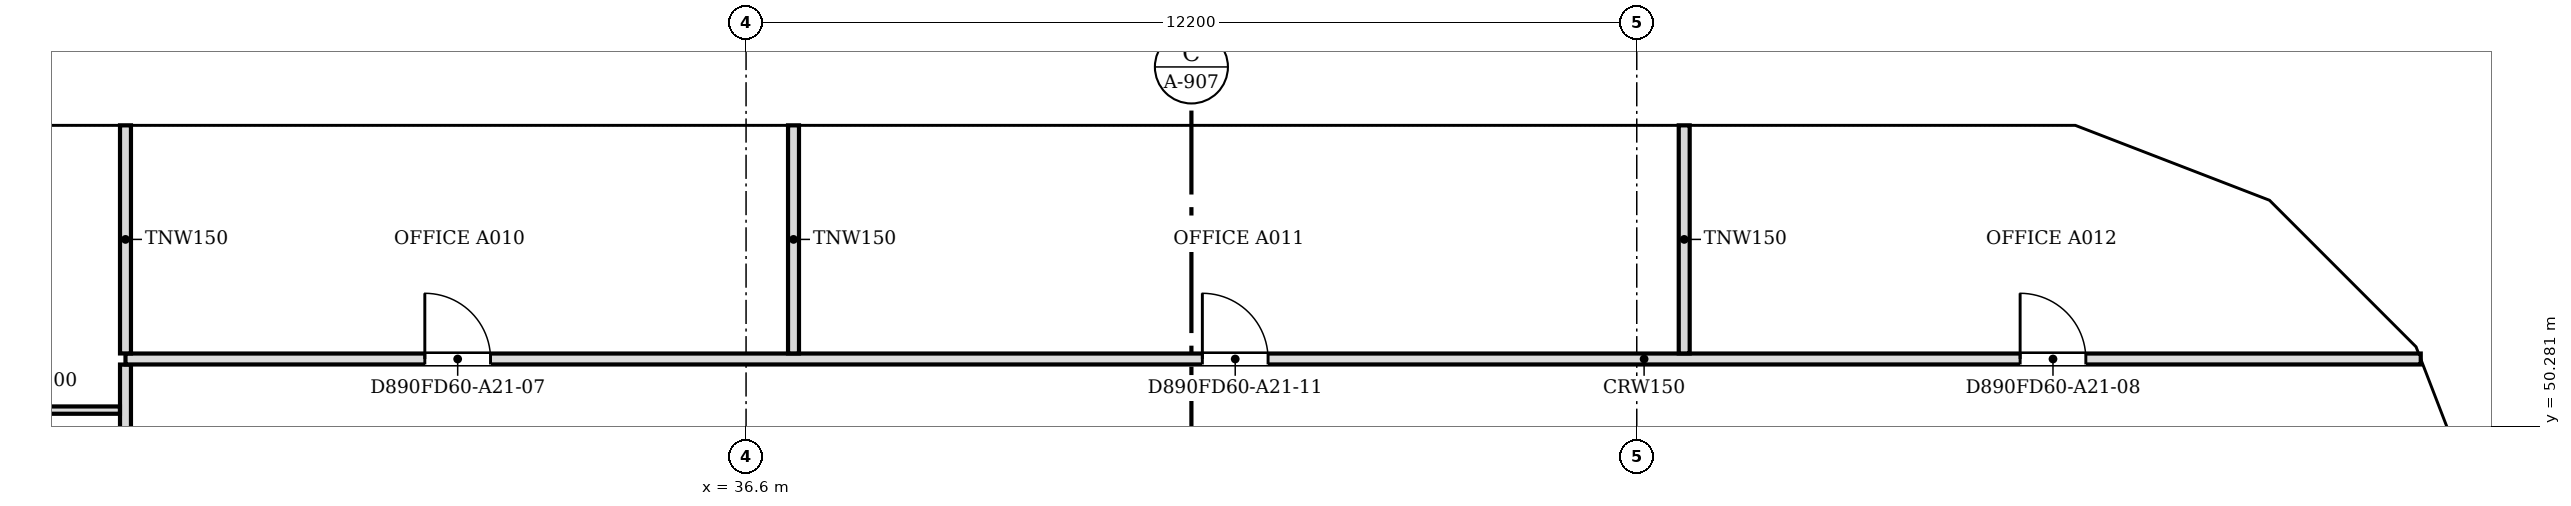
"""IFC4 building model, lengths in metres.
Left out: names, types, materials, properties, quantities, classifications, styles, units other than length and angle.
Written with IfcOpenShell. Run it as: python <this file> out.ifc"""

import sys

from ifc_helpers import new_model, si_unit, direction, frame, frame_2d, origin, place, context, subcontext, project, spatial, polyline, rectangle, outline, extrude, faceted_brep, source, transform, mapped, element, fill, save


model = new_model("IFC4")
c1 = context("Model", 3, precision=1e-05, world=origin(), true_north=direction((0.0, 1.0)))
c2 = subcontext(c1, "Body", "Model", "MODEL_VIEW")
j1 = project(units=[si_unit("LENGTHUNIT", "METRE"), si_unit("PLANEANGLEUNIT", "RADIAN")], contexts=[c1])
p1 = place(None, origin())
s1 = spatial("IfcSite", under=j1, at=p1, CompositionType="ELEMENT")
p2 = place(p1, origin())
s2 = spatial("IfcBuilding", under=s1, at=p2, CompositionType="ELEMENT")
p3 = place(p2, frame((0.0, 0.0, 240.7)))
s3 = spatial("IfcBuildingStorey", under=s2, at=p3, CompositionType="ELEMENT", Elevation=240.7)
m1 = source(origin(), c2, "Body", "Brep", [
    faceted_brep([(0.047, -0.25, 0.0), (2.997, -0.25, 3.8), (0.047, -0.25, 7.6), (0.0, -0.25, 7.541), (0.0, -0.25, 0.059), (0.093, 0.25, 7.54), (2.944, 0.25, 3.868), (2.944, 0.25, 3.732), (0.093, 0.25, 0.06), (2.997, 0.0, 3.8), (0.047, 0.0, 0.0), (0.047, 0.0, 7.6)], [[[0, 1, 2, 3, 4]], [[5, 6, 7, 8]], [[8, 7, 9, 1, 0, 10]], [[6, 5, 11, 2, 1, 9]], [[3, 2, 11]], [[10, 0, 4]], [[8, 10, 4, 3, 11, 5]], [[9, 7, 6]]]),
])
p4 = place(p3, frame((60.767, 48.71, -3.8), z_axis=(0.0, 0.0, 1.0), x_axis=(-0.359901446078, 0.932990326376, 0.0)))
e1 = element("IfcWall", 1, at=p4, inside=s3, PredefinedType="SOLIDWALL", context=c2, shape_type="MappedRepresentation", body=[
    mapped(m1, transform((0.0, 0.0, 0.0), scale=1.0)),
])
m2 = source(origin(), c2, "Body", "SweptSolid", [
    extrude(outline(polyline([(0.247, 0.665), (2.681, 3.8), (0.247, 6.935), (0.247, 0.665)])), frame((0.0, 0.26, 0.0), z_axis=(0.0, -1.0, 0.0), x_axis=(1.0, 0.0, 0.0)), (0.0, 0.0, 1.0), 0.52),
])
p5 = place(p4, origin())
e2 = element("IfcOpeningElement", 2, at=p5, cuts=e1, PredefinedType="OPENING", context=c2, shape_type="MappedRepresentation", body=[
    mapped(m2, transform((0.0, 0.0, 0.0), scale=1.0)),
])
m3 = source(origin(), c2, "Body", "Brep", [
    faceted_brep([(2.944, -0.25, 0.0), (2.997, -0.25, 0.068), (2.997, -0.25, 7.532), (2.944, -0.25, 7.6), (0.0, -0.25, 3.8), (0.053, 0.25, 3.868), (2.891, 0.25, 7.532), (2.891, 0.25, 0.068), (0.053, 0.25, 3.732), (2.944, 0.0, 0.0), (2.944, 0.0, 7.6), (0.0, 0.0, 3.8)], [[[0, 1, 2, 3, 4]], [[5, 6, 7, 8]], [[1, 0, 9]], [[10, 3, 2]], [[6, 5, 11, 4, 3, 10]], [[8, 7, 9, 0, 4, 11]], [[8, 11, 5]], [[1, 9, 7, 6, 10, 2]]]),
])
p6 = place(p3, frame((59.688, 51.506, -3.8), z_axis=(0.0, 0.0, 1.0), x_axis=(-0.707106781187, 0.707106781187, 0.0)))
e3 = element("IfcWall", 3, at=p6, inside=s3, PredefinedType="SOLIDWALL", context=c2, shape_type="MappedRepresentation", body=[
    mapped(m3, transform((0.0, 0.0, 0.0), scale=1.0)),
])
m4 = source(origin(), c2, "Body", "SweptSolid", [
    extrude(outline(polyline([(2.744, 6.934), (0.316, 3.8), (2.744, 0.667), (2.744, 6.934)])), frame((0.0, 0.26, 0.0), z_axis=(0.0, -1.0, 0.0), x_axis=(1.0, 0.0, 0.0)), (0.0, 0.0, 1.0), 0.52),
])
p7 = place(p6, origin())
e4 = element("IfcOpeningElement", 4, at=p7, cuts=e3, PredefinedType="OPENING", context=c2, shape_type="MappedRepresentation", body=[
    mapped(m4, transform((0.0, 0.0, 0.0), scale=1.0)),
])
m5 = source(origin(), c2, "Body", "Brep", [
    faceted_brep([(0.053, -0.25, 0.0), (3.003, -0.25, 3.8), (0.053, -0.25, 7.6), (0.0, -0.25, 7.532), (0.0, -0.25, 0.068), (0.106, 0.25, 7.532), (2.957, 0.25, 3.86), (2.957, 0.25, 3.74), (0.106, 0.25, 0.068), (3.003, 0.0, 3.8), (0.053, 0.0, 0.0), (0.053, 0.0, 7.6)], [[[0, 1, 2, 3, 4]], [[5, 6, 7, 8]], [[8, 7, 9, 1, 0, 10]], [[6, 5, 11, 2, 1, 9]], [[3, 2, 11]], [[10, 0, 4]], [[8, 10, 4, 3, 11, 5]], [[9, 7, 6]]]),
])
p8 = place(p3, frame((57.656, 53.569, -3.8), z_axis=(0.0, 0.0, 1.0), x_axis=(-0.933007896601, 0.359855894603, 0.0)))
e5 = element("IfcWall", 5, at=p8, inside=s3, PredefinedType="SOLIDWALL", context=c2, shape_type="MappedRepresentation", body=[
    mapped(m5, transform((0.0, 0.0, 0.0), scale=1.0)),
])
m6 = source(origin(), c2, "Body", "SweptSolid", [
    extrude(outline(polyline([(0.253, 0.665), (2.687, 3.8), (0.253, 6.935), (0.253, 0.665)])), frame((0.0, 0.26, 0.0), z_axis=(0.0, -1.0, 0.0), x_axis=(1.0, 0.0, 0.0)), (0.0, 0.0, 1.0), 0.52),
])
p9 = place(p8, origin())
e6 = element("IfcOpeningElement", 6, at=p9, cuts=e5, PredefinedType="OPENING", context=c2, shape_type="MappedRepresentation", body=[
    mapped(m6, transform((0.0, 0.0, 0.0), scale=1.0)),
])
m7 = source(origin(), c2, "Body", "Brep", [
    faceted_brep([(3.003, -0.25, 0.0), (6.053, -0.25, 3.8), (3.003, -0.25, 7.6), (0.0, -0.25, 3.8), (0.047, 0.25, 3.859), (3.003, 0.25, 7.6), (6.053, 0.25, 3.8), (3.003, 0.25, 0.0), (0.047, 0.25, 3.741), (0.0, 0.0, 3.8)], [[[0, 1, 2, 3]], [[4, 5, 6, 7, 8]], [[7, 6, 1, 0]], [[6, 5, 2, 1]], [[5, 4, 9, 3, 2]], [[8, 7, 0, 3, 9]], [[8, 9, 4]]]),
])
p10 = place(p3, frame((54.854, 54.65, -3.8), z_axis=(0.0, 0.0, 1.0), x_axis=(-1.0, 0.0, 0.0)))
e7 = element("IfcWall", 7, at=p10, inside=s3, PredefinedType="SOLIDWALL", context=c2, shape_type="MappedRepresentation", body=[
    mapped(m7, transform((0.0, 0.0, 0.0), scale=1.0)),
])
m8 = source(origin(), c2, "Body", "SweptSolid", [
    extrude(outline(polyline([(3.005, 0.401), (5.733, 3.8), (3.005, 7.199), (0.319, 3.8), (3.005, 0.401)])), frame((0.0, 0.26, 0.0), z_axis=(0.0, -1.0, 0.0), x_axis=(1.0, 0.0, 0.0)), (0.0, 0.0, 1.0), 0.52),
])
p11 = place(p10, origin())
e8 = element("IfcOpeningElement", 8, at=p11, cuts=e7, PredefinedType="OPENING", context=c2, shape_type="MappedRepresentation", body=[
    mapped(m8, transform((0.0, 0.0, 0.0), scale=1.0)),
])
m9 = source(origin(), c2, "Body", "SweptSolid", [
    extrude(outline(polyline([(3.05, 0.0), (6.1, 3.8), (3.05, 7.6), (0.0, 3.8), (3.05, 0.0)])), frame((0.0, 0.25, 0.0), z_axis=(0.0, -1.0, 0.0), x_axis=(1.0, 0.0, 0.0)), (0.0, 0.0, 1.0), 0.5),
])
p12 = place(p3, frame((48.8, 54.65, -3.8), z_axis=(0.0, 0.0, 1.0), x_axis=(-1.0, 0.0, 0.0)))
e9 = element("IfcWall", 9, at=p12, inside=s3, PredefinedType="SOLIDWALL", context=c2, shape_type="MappedRepresentation", body=[
    mapped(m9, transform((0.0, 0.0, 0.0), scale=1.0)),
])
m10 = source(origin(), c2, "Body", "SweptSolid", [
    extrude(outline(polyline([(3.05, 0.399), (5.78, 3.8), (3.05, 7.201), (0.321, 3.8), (3.05, 0.399)])), frame((0.0, 0.26, 0.0), z_axis=(0.0, -1.0, 0.0), x_axis=(1.0, 0.0, 0.0)), (0.0, 0.0, 1.0), 0.52),
])
p13 = place(p12, origin())
e10 = element("IfcOpeningElement", 10, at=p13, cuts=e9, PredefinedType="OPENING", context=c2, shape_type="MappedRepresentation", body=[
    mapped(m10, transform((0.0, 0.0, 0.0), scale=1.0)),
])
m11 = source(origin(), c2, "Body", "Brep", [
    faceted_brep([(3.05, -0.25, 0.0), (6.1, -0.25, 3.8), (6.1, -0.25, 3.8), (3.05, -0.25, 7.6), (0.0, -0.25, 3.8), (0.0, 0.25, 3.8), (3.05, 0.25, 7.6), (6.1, 0.25, 3.8), (6.1, 0.25, 3.8), (3.05, 0.25, 0.0)], [[[0, 1, 2, 3, 4]], [[5, 6, 7, 8, 9]], [[9, 8, 1, 0]], [[7, 6, 3, 2]], [[6, 5, 4, 3]], [[5, 9, 0, 4]], [[1, 8, 7, 2]]]),
])
p14 = place(p3, frame((42.7, 54.65, -3.8), z_axis=(0.0, 0.0, 1.0), x_axis=(-1.0, 0.0, 0.0)))
e11 = element("IfcWall", 11, at=p14, inside=s3, PredefinedType="SOLIDWALL", context=c2, shape_type="MappedRepresentation", body=[
    mapped(m11, transform((0.0, 0.0, 0.0), scale=1.0)),
])
p15 = place(p14, origin())
e12 = element("IfcOpeningElement", 12, at=p15, cuts=e11, PredefinedType="OPENING", context=c2, shape_type="MappedRepresentation", body=[
    mapped(m10, transform((0.0, 0.0, 0.0), scale=1.0)),
])
p16 = place(p3, frame((36.6, 54.65, -3.8), z_axis=(0.0, 0.0, 1.0), x_axis=(-1.0, 0.0, 0.0)))
e13 = element("IfcWall", 13, at=p16, inside=s3, PredefinedType="SOLIDWALL", context=c2, shape_type="MappedRepresentation", body=[
    mapped(m9, transform((0.0, 0.0, 0.0), scale=1.0)),
])
p17 = place(p16, origin())
e14 = element("IfcOpeningElement", 14, at=p17, cuts=e13, PredefinedType="OPENING", context=c2, shape_type="MappedRepresentation", body=[
    mapped(m10, transform((0.0, 0.0, 0.0), scale=1.0)),
])
p18 = place(p3, frame((30.5, 54.65, -3.8), z_axis=(0.0, 0.0, 1.0), x_axis=(-1.0, 0.0, 0.0)))
e15 = element("IfcWall", 15, at=p18, inside=s3, PredefinedType="SOLIDWALL", context=c2, shape_type="MappedRepresentation", body=[
    mapped(m9, transform((0.0, 0.0, 0.0), scale=1.0)),
])
p19 = place(p18, origin())
e16 = element("IfcOpeningElement", 16, at=p19, cuts=e15, PredefinedType="OPENING", context=c2, shape_type="MappedRepresentation", body=[
    mapped(m10, transform((0.0, 0.0, 0.0), scale=1.0)),
])
p20 = place(p2, frame((0.0, 0.0, 244.5)))
s4 = spatial("IfcBuildingStorey", under=s2, at=p20, CompositionType="ELEMENT", Elevation=244.5)
m12 = source(origin(), c2, "Body", "Brep", [
    faceted_brep([(2.95, -0.25, 0.0), (3.003, -0.25, 0.068), (3.003, -0.25, 7.532), (2.95, -0.25, 7.6), (0.0, -0.25, 3.8), (0.047, 0.25, 3.86), (2.898, 0.25, 7.532), (2.898, 0.25, 0.068), (0.047, 0.25, 3.74), (2.95, 0.0, 0.0), (2.95, 0.0, 7.6), (0.0, 0.0, 3.8)], [[[0, 1, 2, 3, 4]], [[5, 6, 7, 8]], [[1, 0, 9]], [[10, 3, 2]], [[6, 5, 11, 4, 3, 10]], [[8, 7, 9, 0, 4, 11]], [[8, 11, 5]], [[1, 9, 7, 6, 10, 2]]]),
])
p21 = place(p20, frame((60.75, 48.753, -3.8), z_axis=(0.0, 0.0, 1.0), x_axis=(-0.35992665181, 0.932980602862, 0.0)))
e17 = element("IfcWall", 17, at=p21, inside=s4, PredefinedType="SOLIDWALL", context=c2, shape_type="MappedRepresentation", body=[
    mapped(m12, transform((0.0, 0.0, 0.0), scale=1.0)),
])
m13 = source(origin(), c2, "Body", "SweptSolid", [
    extrude(outline(polyline([(2.75, 6.935), (0.316, 3.8), (2.75, 0.665), (2.75, 6.935)])), frame((0.0, 0.26, 0.0), z_axis=(0.0, -1.0, 0.0), x_axis=(1.0, 0.0, 0.0)), (0.0, 0.0, 1.0), 0.52),
])
p22 = place(p21, origin())
e18 = element("IfcOpeningElement", 18, at=p22, cuts=e17, PredefinedType="OPENING", context=c2, shape_type="MappedRepresentation", body=[
    mapped(m13, transform((0.0, 0.0, 0.0), scale=1.0)),
])
m14 = source(origin(), c2, "Body", "Brep", [
    faceted_brep([(0.053, -0.25, 0.0), (2.997, -0.25, 3.8), (0.053, -0.25, 7.6), (0.0, -0.25, 7.532), (0.0, -0.25, 0.068), (0.106, 0.25, 7.532), (2.944, 0.25, 3.868), (2.944, 0.25, 3.732), (0.106, 0.25, 0.068), (2.997, 0.0, 3.8), (0.053, 0.0, 0.0), (0.053, 0.0, 7.6)], [[[0, 1, 2, 3, 4]], [[5, 6, 7, 8]], [[8, 7, 9, 1, 0, 10]], [[6, 5, 11, 2, 1, 9]], [[3, 2, 11]], [[10, 0, 4]], [[8, 10, 4, 3, 11, 5]], [[9, 7, 6]]]),
])
p23 = place(p20, frame((59.726, 51.469, -3.8), z_axis=(0.0, 0.0, 1.0), x_axis=(-0.707106781187, 0.707106781187, 0.0)))
e19 = element("IfcWall", 19, at=p23, inside=s4, PredefinedType="SOLIDWALL", context=c2, shape_type="MappedRepresentation", body=[
    mapped(m14, transform((0.0, 0.0, 0.0), scale=1.0)),
])
m15 = source(origin(), c2, "Body", "SweptSolid", [
    extrude(outline(polyline([(0.253, 0.666), (2.681, 3.8), (0.253, 6.934), (0.253, 0.666)])), frame((0.0, 0.26, 0.0), z_axis=(0.0, -1.0, 0.0), x_axis=(1.0, 0.0, 0.0)), (0.0, 0.0, 1.0), 0.52),
])
p24 = place(p23, origin())
e20 = element("IfcOpeningElement", 20, at=p24, cuts=e19, PredefinedType="OPENING", context=c2, shape_type="MappedRepresentation", body=[
    mapped(m15, transform((0.0, 0.0, 0.0), scale=1.0)),
])
m16 = source(origin(), c2, "Body", "Brep", [
    faceted_brep([(2.95, -0.25, 0.0), (2.997, -0.25, 0.059), (2.997, -0.25, 7.541), (2.95, -0.25, 7.6), (0.0, -0.25, 3.8), (0.053, 0.25, 3.868), (2.904, 0.25, 7.54), (2.904, 0.25, 0.06), (0.053, 0.25, 3.732), (2.95, 0.0, 0.0), (2.95, 0.0, 7.6), (0.0, 0.0, 3.8)], [[[0, 1, 2, 3, 4]], [[5, 6, 7, 8]], [[1, 0, 9]], [[10, 3, 2]], [[6, 5, 11, 4, 3, 10]], [[8, 7, 9, 0, 4, 11]], [[8, 11, 5]], [[1, 9, 7, 6, 10, 2]]]),
])
p25 = place(p20, frame((57.606, 53.588, -3.8), z_axis=(0.0, 0.0, 1.0), x_axis=(-0.932990326376, 0.359901446078, 0.0)))
e21 = element("IfcWall", 21, at=p25, inside=s4, PredefinedType="SOLIDWALL", context=c2, shape_type="MappedRepresentation", body=[
    mapped(m16, transform((0.0, 0.0, 0.0), scale=1.0)),
])
p26 = place(p25, origin())
e22 = element("IfcOpeningElement", 22, at=p26, cuts=e21, PredefinedType="OPENING", context=c2, shape_type="MappedRepresentation", body=[
    mapped(m13, transform((0.0, 0.0, 0.0), scale=1.0)),
])
m17 = source(origin(), c2, "Body", "Brep", [
    faceted_brep([(0.047, -0.25, 0.0), (3.05, -0.25, 3.8), (0.047, -0.25, 7.6), (0.0, -0.25, 7.54), (0.0, -0.25, 0.06), (0.093, 0.25, 7.541), (3.05, 0.25, 3.8), (0.093, 0.25, 0.059), (0.047, 0.0, 0.0), (0.047, 0.0, 7.6)], [[[0, 1, 2, 3, 4]], [[5, 6, 7]], [[7, 6, 1, 0, 8]], [[6, 5, 9, 2, 1]], [[3, 2, 9]], [[8, 0, 4]], [[7, 8, 4, 3, 9, 5]]]),
])
p27 = place(p20, frame((54.9, 54.65, -3.8), z_axis=(0.0, 0.0, 1.0), x_axis=(-1.0, 0.0, 0.0)))
e23 = element("IfcWall", 23, at=p27, inside=s4, PredefinedType="SOLIDWALL", context=c2, shape_type="MappedRepresentation", body=[
    mapped(m17, transform((0.0, 0.0, 0.0), scale=1.0)),
])
m18 = source(origin(), c2, "Body", "SweptSolid", [
    extrude(outline(polyline([(0.247, 0.656), (2.731, 3.8), (0.247, 6.944), (0.247, 0.656)])), frame((0.0, 0.26, 0.0), z_axis=(0.0, -1.0, 0.0), x_axis=(1.0, 0.0, 0.0)), (0.0, 0.0, 1.0), 0.52),
])
p28 = place(p27, origin())
e24 = element("IfcOpeningElement", 24, at=p28, cuts=e23, PredefinedType="OPENING", context=c2, shape_type="MappedRepresentation", body=[
    mapped(m18, transform((0.0, 0.0, 0.0), scale=1.0)),
])
p29 = place(p20, frame((51.85, 54.65, -3.8), z_axis=(0.0, 0.0, 1.0), x_axis=(-1.0, 0.0, 0.0)))
e25 = element("IfcWall", 25, at=p29, inside=s4, PredefinedType="SOLIDWALL", context=c2, shape_type="MappedRepresentation", body=[
    mapped(m9, transform((0.0, 0.0, 0.0), scale=1.0)),
])
p30 = place(p29, origin())
e26 = element("IfcOpeningElement", 26, at=p30, cuts=e25, PredefinedType="OPENING", context=c2, shape_type="MappedRepresentation", body=[
    mapped(m10, transform((0.0, 0.0, 0.0), scale=1.0)),
])
p31 = place(p20, frame((45.75, 54.65, -3.8), z_axis=(0.0, 0.0, 1.0), x_axis=(-1.0, 0.0, 0.0)))
e27 = element("IfcWall", 27, at=p31, inside=s4, PredefinedType="SOLIDWALL", context=c2, shape_type="MappedRepresentation", body=[
    mapped(m9, transform((0.0, 0.0, 0.0), scale=1.0)),
])
p32 = place(p31, origin())
e28 = element("IfcOpeningElement", 28, at=p32, cuts=e27, PredefinedType="OPENING", context=c2, shape_type="MappedRepresentation", body=[
    mapped(m10, transform((0.0, 0.0, 0.0), scale=1.0)),
])
p33 = place(p20, frame((39.65, 54.65, -3.8), z_axis=(0.0, 0.0, 1.0), x_axis=(-1.0, 0.0, 0.0)))
e29 = element("IfcWall", 29, at=p33, inside=s4, PredefinedType="SOLIDWALL", context=c2, shape_type="MappedRepresentation", body=[
    mapped(m11, transform((0.0, 0.0, 0.0), scale=1.0)),
])
p34 = place(p33, origin())
e30 = element("IfcOpeningElement", 30, at=p34, cuts=e29, PredefinedType="OPENING", context=c2, shape_type="MappedRepresentation", body=[
    mapped(m10, transform((0.0, 0.0, 0.0), scale=1.0)),
])
p35 = place(p20, frame((33.55, 54.65, -3.8), z_axis=(0.0, 0.0, 1.0), x_axis=(-1.0, 0.0, 0.0)))
e31 = element("IfcWall", 31, at=p35, inside=s4, PredefinedType="SOLIDWALL", context=c2, shape_type="MappedRepresentation", body=[
    mapped(m9, transform((0.0, 0.0, 0.0), scale=1.0)),
])
p36 = place(p35, origin())
e32 = element("IfcOpeningElement", 32, at=p36, cuts=e31, PredefinedType="OPENING", context=c2, shape_type="MappedRepresentation", body=[
    mapped(m10, transform((0.0, 0.0, 0.0), scale=1.0)),
])
p37 = place(p20, frame((27.45, 54.65, -3.8), z_axis=(0.0, 0.0, 1.0), x_axis=(-1.0, 0.0, 0.0)))
e33 = element("IfcWall", 33, at=p37, inside=s4, PredefinedType="SOLIDWALL", context=c2, shape_type="MappedRepresentation", body=[
    mapped(m11, transform((0.0, 0.0, 0.0), scale=1.0)),
])
p38 = place(p37, origin())
e34 = element("IfcOpeningElement", 34, at=p38, cuts=e33, PredefinedType="OPENING", context=c2, shape_type="MappedRepresentation", body=[
    mapped(m10, transform((0.0, 0.0, 0.0), scale=1.0)),
])
p39 = place(p3, frame((28.1, 47.376, 0.0), z_axis=(0.0, 0.0, 1.0), x_axis=(0.0, 1.0, 0.0)))
e35 = element("IfcWall", 35, at=p39, inside=s3, PredefinedType="PARTITIONING", context=c2, shape_type="SweptSolid", body=[
    extrude(rectangle(XDim=3.748, YDim=0.15, at=frame_2d((1.874, 0.0))), origin(), (0.0, 0.0, 1.0), 3.067),
])
p40 = place(p3, frame((22.826, 50.5, 0.0), z_axis=(0.0, 0.0, 1.0), x_axis=(1.0, 0.0, 0.0)))
e36 = element("IfcWall", 36, at=p40, inside=s3, PredefinedType="PARTITIONING", context=c2, shape_type="SweptSolid", body=[
    extrude(rectangle(XDim=5.198, YDim=0.1, at=frame_2d((2.599, 0.0))), origin(), (0.0, 0.0, 1.0), 3.067),
])
m19 = source(origin(), c2, "Body", "SweptSolid", [
    extrude(rectangle(XDim=0.9, YDim=2.1, at=frame_2d((0.45, 1.05))), frame((0.0, 0.06, 0.0), z_axis=(0.0, -1.0, 0.0), x_axis=(1.0, 0.0, 0.0)), (0.0, 0.0, 1.0), 0.12),
])
p41 = place(p40, frame((2.1, 0.0, 0.0)))
e37 = element("IfcOpeningElement", 37, at=p41, cuts=e36, PredefinedType="OPENING", context=c2, shape_type="MappedRepresentation", body=[
    mapped(m19, transform((0.0, 0.0, 0.0), scale=1.0)),
])
p42 = place(p3, frame((28.1, 51.2, 0.0), z_axis=(0.0, 0.0, 1.0), x_axis=(1.0, 0.0, 0.0)))
e38 = element("IfcWall", 38, at=p42, inside=s3, PredefinedType="PARTITIONING", context=c2, shape_type="SweptSolid", body=[
    extrude(rectangle(XDim=31.438, YDim=0.15, at=frame_2d((15.719, 0.0))), origin(), (0.0, 0.0, 1.0), 3.067),
])
m20 = source(origin(), c2, "Body", "SweptSolid", [
    extrude(rectangle(XDim=0.9, YDim=2.1, at=frame_2d((0.45, 1.05))), frame((0.0, 0.085, 0.0), z_axis=(0.0, -1.0, 0.0), x_axis=(1.0, 0.0, 0.0)), (0.0, 0.0, 1.0), 0.17),
])
p43 = place(p42, frame((4.1, 0.0, 0.0)))
e39 = element("IfcOpeningElement", 39, at=p43, cuts=e38, PredefinedType="OPENING", context=c2, shape_type="MappedRepresentation", body=[
    mapped(m20, transform((0.0, 0.0, 0.0), scale=1.0)),
])
p44 = place(p42, frame((25.951, 0.0, 0.0)))
e40 = element("IfcOpeningElement", 40, at=p44, cuts=e38, PredefinedType="OPENING", context=c2, shape_type="MappedRepresentation", body=[
    mapped(m20, transform((0.0, 0.0, 0.0), scale=1.0)),
])
p45 = place(p42, frame((14.75, 0.0, 0.0)))
e41 = element("IfcOpeningElement", 41, at=p45, cuts=e38, PredefinedType="OPENING", context=c2, shape_type="MappedRepresentation", body=[
    mapped(m20, transform((0.0, 0.0, 0.0), scale=1.0)),
])
for number, where, z_axis, x_axis in (
    (42, (28.1, 51.276, 0.0), (0.0, 0.0, 1.0), (0.0, 1.0, 0.0)),
    (43, (37.25, 51.276, 0.0), (0.0, 0.0, 1.0), (0.0, 1.0, 0.0)),
    (44, (49.45, 51.276, 0.0), (0.0, 0.0, 1.0), (0.0, 1.0, 0.0)),
):
    element("IfcWall", number, at=place(p3, frame(where, z_axis=z_axis, x_axis=x_axis)), inside=s3, PredefinedType="PARTITIONING", context=c2, shape_type="SweptSolid", body=[
        extrude(rectangle(XDim=3.124, YDim=0.15, at=frame_2d((1.562, 0.0))), origin(), (0.0, 0.0, 1.0), 3.067),
    ])
m21 = source(origin(), c2, "Body", "SweptSolid", [
    extrude(rectangle(XDim=0.9, YDim=2.1, at=frame_2d((0.45, 1.05))), frame((0.0, 0.025, 0.0), z_axis=(0.0, -1.0, 0.0), x_axis=(1.0, 0.0, 0.0)), (0.0, 0.0, 1.0), 0.05),
])
p46 = place(p43, origin())
e45 = element("IfcDoor", 45, at=p46, inside=s3, OperationType="SINGLE_SWING_LEFT", PredefinedType="DOOR", context=c2, shape_type="MappedRepresentation", body=[
    mapped(m21, transform((0.0, 0.0, 0.0), scale=1.0)),
])
fill(e39, e45)
p47 = place(p44, origin())
e46 = element("IfcDoor", 46, at=p47, inside=s3, OperationType="SINGLE_SWING_LEFT", PredefinedType="DOOR", context=c2, shape_type="MappedRepresentation", body=[
    mapped(m21, transform((0.0, 0.0, 0.0), scale=1.0)),
])
fill(e40, e46)
p48 = place(p45, origin())
e47 = element("IfcDoor", 47, at=p48, inside=s3, OperationType="SINGLE_SWING_LEFT", PredefinedType="DOOR", context=c2, shape_type="MappedRepresentation", body=[
    mapped(m21, transform((0.0, 0.0, 0.0), scale=1.0)),
])
fill(e41, e47)
save(model, sys.argv[1])
